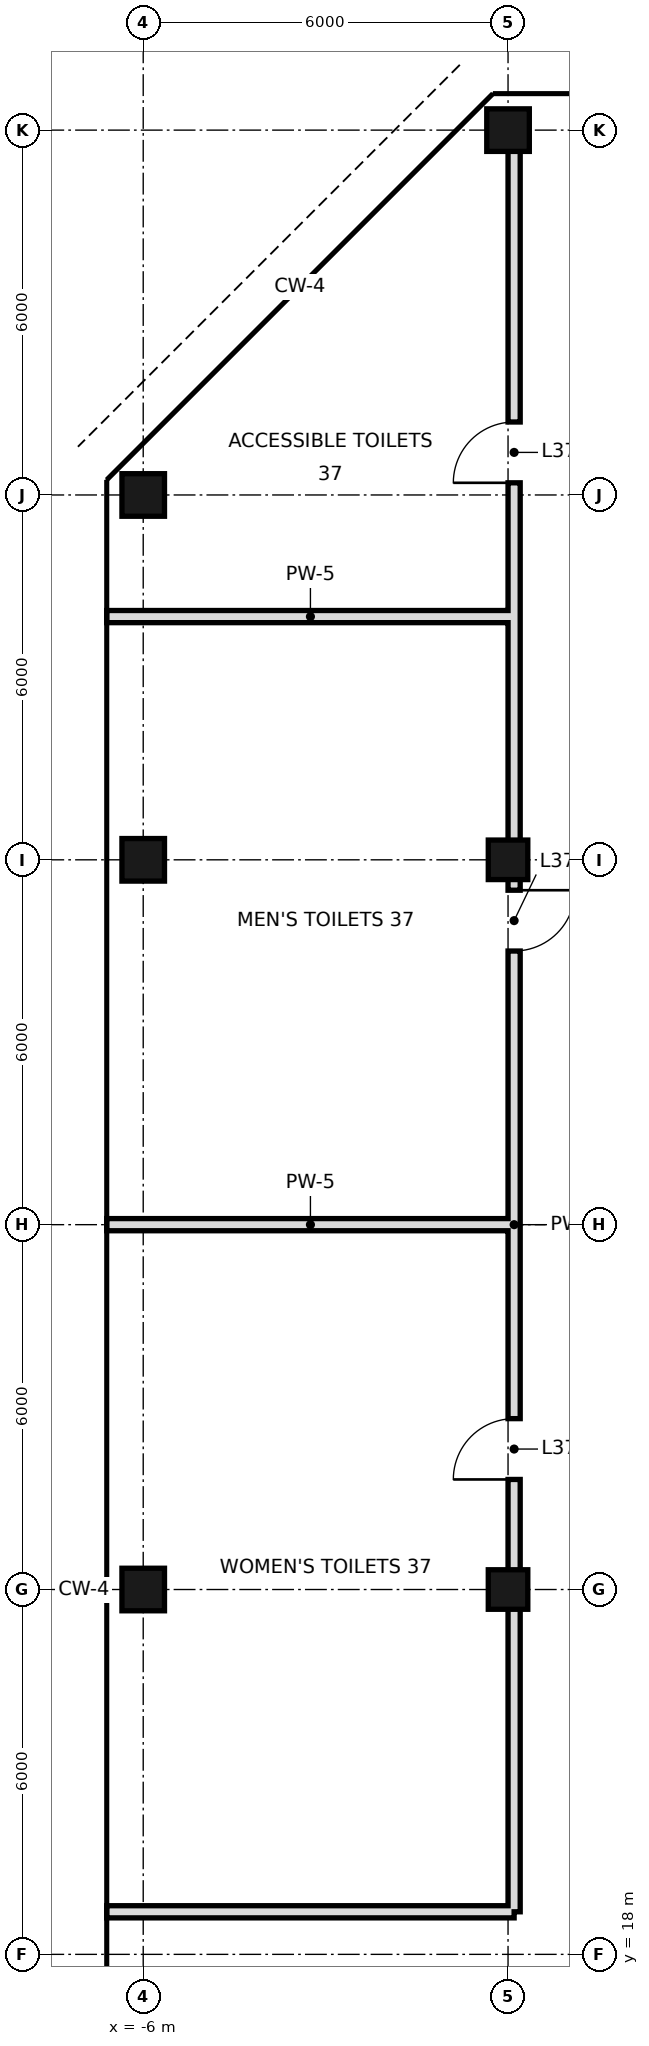
"""IFC4 building model, lengths in metres.
Left out: names, types, materials, properties, quantities, classifications, styles, units other than length and angle.
Written with IfcOpenShell. Run it as: python <this file> out.ifc"""

import sys

from ifc_helpers import new_model, si_unit, direction, frame, frame_2d, origin, origin_2d, place, context, subcontext, project, spatial, rectangle, hollow_rectangle, extrude, element, fill, save


model = new_model("IFC4")
c1 = context("Model", 3, precision=1e-05, world=origin(), true_north=direction((0.0, 1.0)))
c2 = subcontext(c1, "Body", "Model", "MODEL_VIEW")
j1 = project(units=[si_unit("LENGTHUNIT", "METRE"), si_unit("PLANEANGLEUNIT", "RADIAN")], contexts=[c1])
p1 = place(None, origin())
s1 = spatial("IfcSite", under=j1, at=p1, CompositionType="ELEMENT")
p2 = place(p1, origin())
s2 = spatial("IfcBuilding", under=s1, at=p2, CompositionType="ELEMENT")
p3 = place(p2, frame((0.0, 0.0, 161.8)))
s3 = spatial("IfcBuildingStorey", under=s2, at=p3, CompositionType="ELEMENT", Elevation=161.8)
for number, where, z_axis, x_axis in (
    (1, (-6.0, 24.0, 0.0), (0.0, 0.0, 1.0), (1.0, 0.0, 0.0)),
    (2, (-6.0, 36.0, 0.0), (0.0, 0.0, 1.0), (1.0, 0.0, 0.0)),
    (3, (-6.0, 42.0, 0.0), (0.0, 0.0, 1.0), (1.0, 0.0, 0.0)),
):
    element("IfcColumn", number, at=place(p3, frame(where, z_axis=z_axis, x_axis=x_axis)), inside=s3, PredefinedType="COLUMN", context=c2, shape_type="SweptSolid", body=[
        extrude(hollow_rectangle(XDim=0.7, YDim=0.7, WallThickness=0.036, at=origin_2d()), origin(), (0.0, 0.0, 1.0), 5.4),
    ])
for number, where, z_axis, x_axis in (
    (4, (0.0, 24.0, 0.0), (0.0, 0.0, 1.0), (1.0, 0.0, 0.0)),
    (5, (0.0, 36.0, 0.0), (0.0, 0.0, 1.0), (1.0, 0.0, 0.0)),
):
    element("IfcColumn", number, at=place(p3, frame(where, z_axis=z_axis, x_axis=x_axis)), inside=s3, PredefinedType="COLUMN", context=c2, shape_type="SweptSolid", body=[
        extrude(hollow_rectangle(XDim=0.65, YDim=0.65, WallThickness=0.032, at=origin_2d()), origin(), (0.0, 0.0, 1.0), 5.4),
    ])
p4 = place(p3, frame((0.0, 48.0, 0.0), z_axis=(0.0, 0.0, 1.0), x_axis=(1.0, 0.0, 0.0)))
e6 = element("IfcColumn", 6, at=p4, inside=s3, PredefinedType="COLUMN", context=c2, shape_type="SweptSolid", body=[
    extrude(hollow_rectangle(XDim=0.7, YDim=0.7, WallThickness=0.036, at=origin_2d()), origin(), (0.0, 0.0, 1.0), 5.4),
])
p5 = place(p3, frame((0.1, 18.7, 0.0), z_axis=(0.0, 0.0, 1.0), x_axis=(0.0, 1.0, 0.0)))
e7 = element("IfcWall", 7, at=p5, inside=s3, PredefinedType="SOLIDWALL", context=c2, shape_type="SweptSolid", body=[
    extrude(rectangle(XDim=29.3, YDim=0.2, at=frame_2d((14.65, 0.0))), origin(), (0.0, 0.0, 1.0), 4.52),
])
p6 = place(p5, frame((7.11, 0.0, 0.0)))
e8 = element("IfcOpeningElement", 8, at=p6, cuts=e7, PredefinedType="OPENING", context=c2, shape_type="SweptSolid", body=[
    extrude(rectangle(XDim=1.0, YDim=2.4, at=frame_2d((0.5, 1.2))), frame((0.0, 0.11, 0.0), z_axis=(0.0, -1.0, 0.0), x_axis=(1.0, 0.0, 0.0)), (0.0, 0.0, 1.0), 0.22),
])
p7 = place(p5, frame((15.8, 0.0, 0.0)))
e9 = element("IfcOpeningElement", 9, at=p7, cuts=e7, PredefinedType="OPENING", context=c2, shape_type="SweptSolid", body=[
    extrude(rectangle(XDim=1.0, YDim=2.4, at=frame_2d((0.5, 1.2))), frame((0.0, 0.11, 0.0), z_axis=(0.0, -1.0, 0.0), x_axis=(1.0, 0.0, 0.0)), (0.0, 0.0, 1.0), 0.22),
])
p8 = place(p5, frame((23.5, 0.0, 0.0)))
e10 = element("IfcOpeningElement", 10, at=p8, cuts=e7, PredefinedType="OPENING", context=c2, shape_type="SweptSolid", body=[
    extrude(rectangle(XDim=1.0, YDim=2.4, at=frame_2d((0.5, 1.2))), frame((0.0, 0.11, 0.0), z_axis=(0.0, -1.0, 0.0), x_axis=(1.0, 0.0, 0.0)), (0.0, 0.0, 1.0), 0.22),
])
for number, where, z_axis, x_axis in (
    (11, (-6.6, 18.7, 0.0), (0.0, 0.0, 1.0), (1.0, 0.0, 0.0)),
    (12, (-6.6, 30.0, 0.0), (0.0, 0.0, 1.0), (1.0, 0.0, 0.0)),
    (13, (-6.6, 40.0, 0.0), (0.0, 0.0, 1.0), (1.0, 0.0, 0.0)),
):
    element("IfcWall", number, at=place(p3, frame(where, z_axis=z_axis, x_axis=x_axis)), inside=s3, PredefinedType="SOLIDWALL", context=c2, shape_type="SweptSolid", body=[
        extrude(rectangle(XDim=6.7, YDim=0.2, at=frame_2d((3.35, 0.0))), origin(), (0.0, 0.0, 1.0), 4.52),
    ])
p9 = place(p6, origin())
e14 = element("IfcDoor", 14, at=p9, inside=s3, OperationType="SINGLE_SWING_LEFT", PredefinedType="DOOR", context=c2, shape_type="SweptSolid", body=[
    extrude(rectangle(XDim=1.0, YDim=2.4, at=frame_2d((0.5, 1.2))), frame((0.0, 0.025, 0.0), z_axis=(0.0, -1.0, 0.0), x_axis=(1.0, 0.0, 0.0)), (0.0, 0.0, 1.0), 0.05),
])
fill(e8, e14)
p10 = place(p7, origin())
e15 = element("IfcDoor", 15, at=p10, inside=s3, OperationType="SINGLE_SWING_RIGHT", PredefinedType="DOOR", context=c2, shape_type="SweptSolid", body=[
    extrude(rectangle(XDim=1.0, YDim=2.4, at=frame_2d((0.5, 1.2))), frame((0.0, 0.025, 0.0), z_axis=(0.0, -1.0, 0.0), x_axis=(1.0, 0.0, 0.0)), (0.0, 0.0, 1.0), 0.05),
])
fill(e9, e15)
p11 = place(p8, origin())
e16 = element("IfcDoor", 16, at=p11, inside=s3, OperationType="SINGLE_SWING_LEFT", PredefinedType="DOOR", context=c2, shape_type="SweptSolid", body=[
    extrude(rectangle(XDim=1.0, YDim=2.4, at=frame_2d((0.5, 1.2))), frame((0.0, 0.025, 0.0), z_axis=(0.0, -1.0, 0.0), x_axis=(1.0, 0.0, 0.0)), (0.0, 0.0, 1.0), 0.05),
])
fill(e10, e16)
save(model, sys.argv[1])
